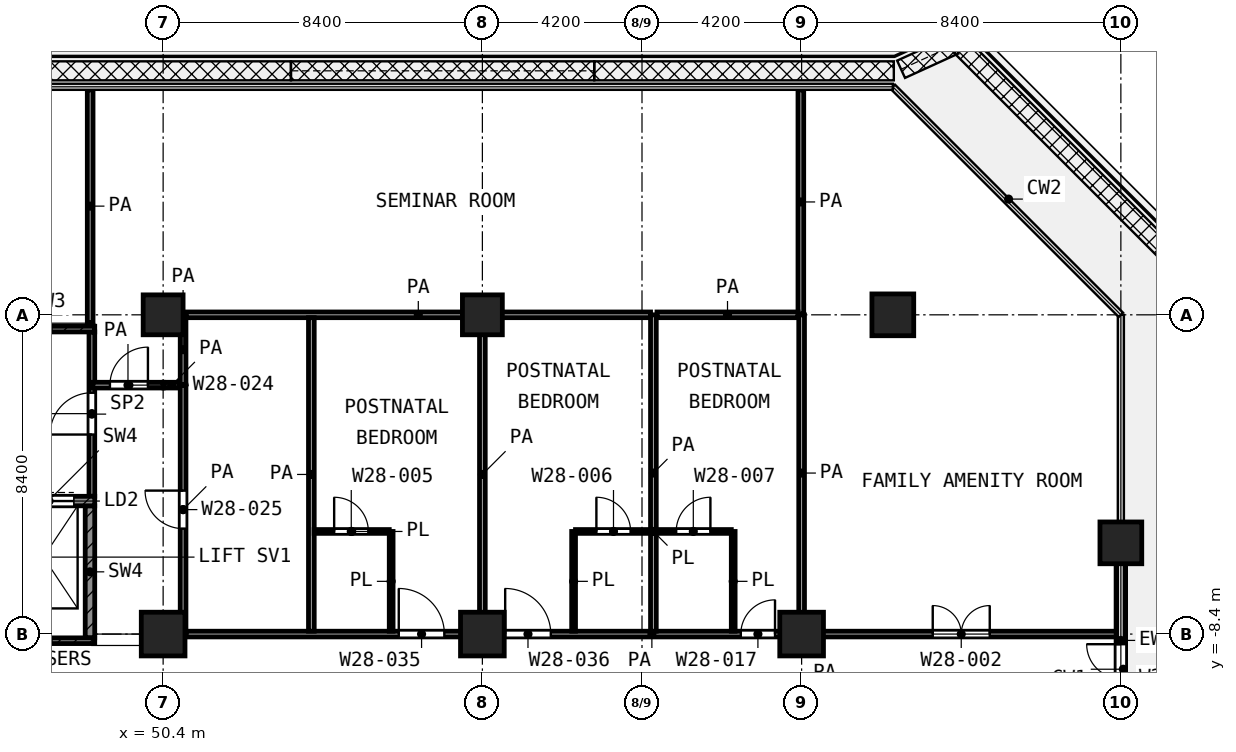
"""IFC4 building model, lengths in metres.
Left out: names, types, materials, properties, quantities, classifications, styles, units other than length and angle.
Written with IfcOpenShell. Run it as: python <this file> out.ifc"""

import sys

from ifc_helpers import new_model, si_unit, direction, frame, frame_2d, origin, origin_2d, place, context, subcontext, project, spatial, rectangle, extrude, element, fill, save


model = new_model("IFC4")
c1 = context("Model", 3, precision=1e-05, world=origin(), true_north=direction((0.0, 1.0)))
c2 = subcontext(c1, "Body", "Model", "MODEL_VIEW")
j1 = project(units=[si_unit("LENGTHUNIT", "METRE"), si_unit("PLANEANGLEUNIT", "RADIAN")], contexts=[c1])
p1 = place(None, origin())
s1 = spatial("IfcSite", under=j1, at=p1, CompositionType="ELEMENT")
p2 = place(p1, origin())
s2 = spatial("IfcBuilding", under=s1, at=p2, CompositionType="ELEMENT")
p3 = place(p2, frame((0.0, 0.0, 124.0)))
s3 = spatial("IfcBuildingStorey", under=s2, at=p3, CompositionType="ELEMENT", Elevation=124.0)
for number, where, z_axis, x_axis in (
    (1, (50.4, 0.0, 0.0), (0.0, 0.0, 1.0), (1.0, 0.0, 0.0)),
    (2, (58.8, 0.0, 0.0), (0.0, 0.0, 1.0), (1.0, 0.0, 0.0)),
):
    element("IfcColumn", number, at=place(p3, frame(where, z_axis=z_axis, x_axis=x_axis)), inside=s3, PredefinedType="COLUMN", context=c2, shape_type="SweptSolid", body=[
        extrude(rectangle(XDim=1.05, YDim=1.05, at=origin_2d()), origin(), (0.0, 0.0, 1.0), 4.2),
    ])
for number, where, z_axis, x_axis in (
    (3, (69.6, 0.0, 0.0), (0.0, 0.0, 1.0), (1.0, 0.0, 0.0)),
    (4, (75.6, -6.0, 0.0), (0.0, 0.0, 1.0), (1.0, 0.0, 0.0)),
):
    element("IfcColumn", number, at=place(p3, frame(where, z_axis=z_axis, x_axis=x_axis)), inside=s3, PredefinedType="COLUMN", context=c2, shape_type="SweptSolid", body=[
        extrude(rectangle(XDim=1.1, YDim=1.1, at=origin_2d()), origin(), (0.0, 0.0, 1.0), 4.2),
    ])
for number, where, z_axis, x_axis in (
    (5, (50.4, -8.4, 0.0), (0.0, 0.0, 1.0), (1.0, 0.0, 0.0)),
    (6, (58.8, -8.4, 0.0), (0.0, 0.0, 1.0), (1.0, 0.0, 0.0)),
    (7, (67.2, -8.4, 0.0), (0.0, 0.0, 1.0), (1.0, 0.0, 0.0)),
):
    element("IfcColumn", number, at=place(p3, frame(where, z_axis=z_axis, x_axis=x_axis)), inside=s3, PredefinedType="COLUMN", context=c2, shape_type="SweptSolid", body=[
        extrude(rectangle(XDim=1.15, YDim=1.15, at=origin_2d()), origin(), (0.0, 0.0, 1.0), 4.2),
    ])
p4 = place(p3, frame((75.6, -10.583, 0.0), z_axis=(0.0, 0.0, 1.0), x_axis=(0.0, 1.0, 0.0)))
e8 = element("IfcWall", 8, at=p4, inside=s3, PredefinedType="SOLIDWALL", context=c2, shape_type="SweptSolid", body=[
    extrude(rectangle(XDim=4.033, YDim=0.25, at=frame_2d((2.017, 0.0))), origin(), (0.0, 0.0, 1.0), 3.48),
])
p5 = place(p4, frame((0.117, 0.0, 0.0)))
e9 = element("IfcOpeningElement", 9, at=p5, cuts=e8, PredefinedType="OPENING", context=c2, shape_type="SweptSolid", body=[
    extrude(rectangle(XDim=1.8, YDim=2.1, at=frame_2d((0.9, 1.05))), frame((0.0, 0.135, 0.0), z_axis=(0.0, -1.0, 0.0), x_axis=(1.0, 0.0, 0.0)), (0.0, 0.0, 1.0), 0.27),
])
for number, where, z_axis, x_axis in (
    (10, (46.15, -0.375, 0.0), (0.0, 0.0, 1.0), (1.0, 0.0, 0.0)),
    (11, (46.15, -8.575, 0.0), (0.0, 0.0, 1.0), (1.0, 0.0, 0.0)),
):
    element("IfcWall", number, at=place(p3, frame(where, z_axis=z_axis, x_axis=x_axis)), inside=s3, PredefinedType="SHEAR", context=c2, shape_type="SweptSolid", body=[
        extrude(rectangle(XDim=2.45, YDim=0.15, at=frame_2d((1.225, 0.0))), origin(), (0.0, 0.0, 1.0), 3.6),
    ])
p6 = place(p3, frame((46.15, -4.9, 0.0), z_axis=(0.0, 0.0, 1.0), x_axis=(1.0, 0.0, 0.0)))
e12 = element("IfcWall", 12, at=p6, inside=s3, PredefinedType="SHEAR", context=c2, shape_type="SweptSolid", body=[
    extrude(rectangle(XDim=2.45, YDim=0.25, at=frame_2d((1.225, 0.0))), origin(), (0.0, 0.0, 1.0), 3.6),
])
p7 = place(p6, frame((0.6, 0.0, 0.0)))
e13 = element("IfcOpeningElement", 13, at=p7, cuts=e12, PredefinedType="OPENING", context=c2, shape_type="SweptSolid", body=[
    extrude(rectangle(XDim=1.3, YDim=2.1, at=frame_2d((0.65, 1.05))), frame((0.0, 0.135, 0.0), z_axis=(0.0, -1.0, 0.0), x_axis=(1.0, 0.0, 0.0)), (0.0, 0.0, 1.0), 0.27),
])
p8 = place(p3, frame((48.475, -8.5, 0.0), z_axis=(0.0, 0.0, 1.0), x_axis=(0.0, 1.0, 0.0)))
e14 = element("IfcWall", 14, at=p8, inside=s3, PredefinedType="SHEAR", context=c2, shape_type="SweptSolid", body=[
    extrude(rectangle(XDim=3.475, YDim=0.25, at=frame_2d((1.738, 0.0))), origin(), (0.0, 0.0, 1.0), 3.6),
])
p9 = place(p3, frame((48.525, -4.775, 0.0), z_axis=(0.0, 0.0, 1.0), x_axis=(0.0, 1.0, 0.0)))
e15 = element("IfcWall", 15, at=p9, inside=s3, PredefinedType="PARTITIONING", context=c2, shape_type="SweptSolid", body=[
    extrude(rectangle(XDim=4.325, YDim=0.15, at=frame_2d((2.163, 0.0))), origin(), (0.0, 0.0, 1.0), 3.6),
])
p10 = place(p9, frame((1.625, 0.0, 0.0)))
e16 = element("IfcOpeningElement", 16, at=p10, cuts=e15, PredefinedType="OPENING", context=c2, shape_type="SweptSolid", body=[
    extrude(rectangle(XDim=1.1, YDim=2.1, at=frame_2d((0.55, 1.05))), frame((0.0, 0.085, 0.0), z_axis=(0.0, -1.0, 0.0), x_axis=(1.0, 0.0, 0.0)), (0.0, 0.0, 1.0), 0.17),
])
p11 = place(p3, frame((54.375, -5.7, 0.0), z_axis=(0.0, 0.0, 1.0), x_axis=(1.0, 0.0, 0.0)))
e17 = element("IfcWall", 17, at=p11, inside=s3, PredefinedType="PARTITIONING", context=c2, shape_type="SweptSolid", body=[
    extrude(rectangle(XDim=1.975, YDim=0.1, at=frame_2d((0.988, 0.0))), origin(), (0.0, 0.0, 1.0), 3.6),
])
p12 = place(p11, frame((0.525, 0.0, 0.0)))
e18 = element("IfcOpeningElement", 18, at=p12, cuts=e17, PredefinedType="OPENING", context=c2, shape_type="SweptSolid", body=[
    extrude(rectangle(XDim=0.9, YDim=2.1, at=frame_2d((0.45, 1.05))), frame((0.0, 0.06, 0.0), z_axis=(0.0, -1.0, 0.0), x_axis=(1.0, 0.0, 0.0)), (0.0, 0.0, 1.0), 0.12),
])
p13 = place(p3, frame((61.25, -5.7, 0.0), z_axis=(0.0, 0.0, 1.0), x_axis=(1.0, 0.0, 0.0)))
e19 = element("IfcWall", 19, at=p13, inside=s3, PredefinedType="PARTITIONING", context=c2, shape_type="SweptSolid", body=[
    extrude(rectangle(XDim=4.1, YDim=0.1, at=frame_2d((2.05, 0.0))), origin(), (0.0, 0.0, 1.0), 3.6),
])
p14 = place(p13, frame((0.55, 0.0, 0.0)))
e20 = element("IfcOpeningElement", 20, at=p14, cuts=e19, PredefinedType="OPENING", context=c2, shape_type="SweptSolid", body=[
    extrude(rectangle(XDim=0.9, YDim=2.1, at=frame_2d((0.45, 1.05))), frame((0.0, 0.06, 0.0), z_axis=(0.0, -1.0, 0.0), x_axis=(1.0, 0.0, 0.0)), (0.0, 0.0, 1.0), 0.12),
])
p15 = place(p13, frame((2.65, 0.0, 0.0)))
e21 = element("IfcOpeningElement", 21, at=p15, cuts=e19, PredefinedType="OPENING", context=c2, shape_type="SweptSolid", body=[
    extrude(rectangle(XDim=0.9, YDim=2.1, at=frame_2d((0.45, 1.05))), frame((0.0, 0.06, 0.0), z_axis=(0.0, -1.0, 0.0), x_axis=(1.0, 0.0, 0.0)), (0.0, 0.0, 1.0), 0.12),
])
for number, where, z_axis, x_axis in (
    (22, (56.4, -8.325, 0.0), (0.0, 0.0, 1.0), (0.0, 1.0, 0.0)),
    (23, (61.2, -8.325, 0.0), (0.0, 0.0, 1.0), (0.0, 1.0, 0.0)),
    (24, (65.4, -8.325, 0.0), (0.0, 0.0, 1.0), (0.0, 1.0, 0.0)),
):
    element("IfcWall", number, at=place(p3, frame(where, z_axis=z_axis, x_axis=x_axis)), inside=s3, PredefinedType="PARTITIONING", context=c2, shape_type="SweptSolid", body=[
        extrude(rectangle(XDim=2.625, YDim=0.1, at=frame_2d((1.312, 0.0))), origin(), (0.0, 0.0, 1.0), 3.6),
    ])
p16 = place(p3, frame((51.0, -8.4, 0.0), z_axis=(0.0, 0.0, 1.0), x_axis=(1.0, 0.0, 0.0)))
e25 = element("IfcWall", 25, at=p16, inside=s3, PredefinedType="PARTITIONING", context=c2, shape_type="SweptSolid", body=[
    extrude(rectangle(XDim=24.52, YDim=0.15, at=frame_2d((12.26, 0.0))), origin(), (0.0, 0.0, 1.0), 3.6),
])
p17 = place(p16, frame((5.6, 0.0, 0.0)))
e26 = element("IfcOpeningElement", 26, at=p17, cuts=e25, PredefinedType="OPENING", context=c2, shape_type="SweptSolid", body=[
    extrude(rectangle(XDim=1.2, YDim=2.1, at=frame_2d((0.6, 1.05))), frame((0.0, 0.085, 0.0), z_axis=(0.0, -1.0, 0.0), x_axis=(1.0, 0.0, 0.0)), (0.0, 0.0, 1.0), 0.17),
])
p18 = place(p16, frame((8.4, 0.0, 0.0)))
e27 = element("IfcOpeningElement", 27, at=p18, cuts=e25, PredefinedType="OPENING", context=c2, shape_type="SweptSolid", body=[
    extrude(rectangle(XDim=1.2, YDim=2.1, at=frame_2d((0.6, 1.05))), frame((0.0, 0.085, 0.0), z_axis=(0.0, -1.0, 0.0), x_axis=(1.0, 0.0, 0.0)), (0.0, 0.0, 1.0), 0.17),
])
p19 = place(p16, frame((14.6, 0.0, 0.0)))
e28 = element("IfcOpeningElement", 28, at=p19, cuts=e25, PredefinedType="OPENING", context=c2, shape_type="SweptSolid", body=[
    extrude(rectangle(XDim=0.9, YDim=2.1, at=frame_2d((0.45, 1.05))), frame((0.0, 0.085, 0.0), z_axis=(0.0, -1.0, 0.0), x_axis=(1.0, 0.0, 0.0)), (0.0, 0.0, 1.0), 0.17),
])
p20 = place(p16, frame((19.65, 0.0, 0.0)))
e29 = element("IfcOpeningElement", 29, at=p20, cuts=e25, PredefinedType="OPENING", context=c2, shape_type="SweptSolid", body=[
    extrude(rectangle(XDim=1.5, YDim=2.1, at=frame_2d((0.75, 1.05))), frame((0.0, 0.085, 0.0), z_axis=(0.0, -1.0, 0.0), x_axis=(1.0, 0.0, 0.0)), (0.0, 0.0, 1.0), 0.17),
])
p21 = place(p3, frame((48.55, -1.85, 0.0), z_axis=(0.0, 0.0, 1.0), x_axis=(1.0, 0.0, 0.0)))
e30 = element("IfcWall", 30, at=p21, inside=s3, PredefinedType="PARTITIONING", context=c2, shape_type="SweptSolid", body=[
    extrude(rectangle(XDim=1.85, YDim=0.15, at=frame_2d((0.925, 0.0))), origin(), (0.0, 0.0, 1.0), 3.6),
])
p22 = place(p21, frame((0.45, 0.0, 0.0)))
e31 = element("IfcOpeningElement", 31, at=p22, cuts=e30, PredefinedType="OPENING", context=c2, shape_type="SweptSolid", body=[
    extrude(rectangle(XDim=1.0, YDim=2.1, at=frame_2d((0.5, 1.05))), frame((0.0, 0.085, 0.0), z_axis=(0.0, -1.0, 0.0), x_axis=(1.0, 0.0, 0.0)), (0.0, 0.0, 1.0), 0.17),
])
p23 = place(p3, frame((50.42, -1.85, 0.0), z_axis=(0.0, 0.0, 1.0), x_axis=(1.0, 0.0, 0.0)))
e32 = element("IfcWall", 32, at=p23, inside=s3, PredefinedType="PARTITIONING", context=c2, shape_type="SweptSolid", body=[
    extrude(rectangle(XDim=0.41, YDim=0.15, at=frame_2d((0.205, 0.0))), origin(), (0.0, 0.0, 1.0), 3.6),
])
p24 = place(p3, frame((51.003, 0.0, 0.0), z_axis=(0.0, 0.0, 1.0), x_axis=(1.0, 0.0, 0.0)))
e33 = element("IfcWall", 33, at=p24, inside=s3, PredefinedType="PARTITIONING", context=c2, shape_type="SweptSolid", body=[
    extrude(rectangle(XDim=12.222, YDim=0.15, at=frame_2d((6.111, 0.0))), origin(), (0.0, 0.0, 1.0), 3.6),
])
p25 = place(p3, frame((63.395, 0.0, 0.0), z_axis=(0.0, 0.0, 1.0), x_axis=(1.0, 0.0, 0.0)))
e34 = element("IfcWall", 34, at=p25, inside=s3, PredefinedType="PARTITIONING", context=c2, shape_type="SweptSolid", body=[
    extrude(rectangle(XDim=3.71, YDim=0.15, at=frame_2d((1.855, 0.0))), origin(), (0.0, 0.0, 1.0), 3.6),
])
p26 = place(p3, frame((48.48, -0.2, 0.0), z_axis=(0.0, 0.0, 1.0), x_axis=(0.0, 1.0, 0.0)))
e35 = element("IfcWall", 35, at=p26, inside=s3, PredefinedType="PARTITIONING", context=c2, shape_type="SweptSolid", body=[
    extrude(rectangle(XDim=6.12, YDim=0.15, at=frame_2d((3.06, 0.0))), origin(), (0.0, 0.0, 1.0), 3.6),
])
p27 = place(p3, frame((50.925, -8.4, 0.0), z_axis=(0.0, 0.0, 1.0), x_axis=(0.0, 1.0, 0.0)))
e36 = element("IfcWall", 36, at=p27, inside=s3, PredefinedType="PARTITIONING", context=c2, shape_type="SweptSolid", body=[
    extrude(rectangle(XDim=6.55, YDim=0.15, at=frame_2d((3.275, 0.0))), origin(), (0.0, 0.0, 1.0), 3.6),
])
p28 = place(p27, frame((2.775, 0.0, 0.0)))
e37 = element("IfcOpeningElement", 37, at=p28, cuts=e36, PredefinedType="OPENING", context=c2, shape_type="SweptSolid", body=[
    extrude(rectangle(XDim=1.0, YDim=2.1, at=frame_2d((0.5, 1.05))), frame((0.0, 0.085, 0.0), z_axis=(0.0, -1.0, 0.0), x_axis=(1.0, 0.0, 0.0)), (0.0, 0.0, 1.0), 0.17),
])
p29 = place(p3, frame((50.925, -1.83, 0.0), z_axis=(0.0, 0.0, 1.0), x_axis=(0.0, 1.0, 0.0)))
e38 = element("IfcWall", 38, at=p29, inside=s3, PredefinedType="PARTITIONING", context=c2, shape_type="SweptSolid", body=[
    extrude(rectangle(XDim=1.827, YDim=0.15, at=frame_2d((0.914, 0.0))), origin(), (0.0, 0.0, 1.0), 3.6),
])
for number, where, z_axis, x_axis in (
    (39, (54.3, -8.325, 0.0), (0.0, 0.0, 1.0), (0.0, 1.0, 0.0)),
    (40, (58.8, -8.325, 0.0), (0.0, 0.0, 1.0), (0.0, 1.0, 0.0)),
):
    element("IfcWall", number, at=place(p3, frame(where, z_axis=z_axis, x_axis=x_axis)), inside=s3, PredefinedType="PARTITIONING", context=c2, shape_type="SweptSolid", body=[
        extrude(rectangle(XDim=8.25, YDim=0.15, at=frame_2d((4.125, 0.0))), origin(), (0.0, 0.0, 1.0), 3.6),
    ])
p30 = place(p3, frame((63.3, -8.325, 0.0), z_axis=(0.0, 0.0, 1.0), x_axis=(0.0, 1.0, 0.0)))
e41 = element("IfcWall", 41, at=p30, inside=s3, PredefinedType="PARTITIONING", context=c2, shape_type="SweptSolid", body=[
    extrude(rectangle(XDim=8.325, YDim=0.15, at=frame_2d((4.163, 0.0))), origin(), (0.0, 0.0, 1.0), 3.6),
])
p31 = place(p3, frame((67.18, 0.02, 0.0), z_axis=(0.0, 0.0, 1.0), x_axis=(0.0, 1.0, 0.0)))
e42 = element("IfcWall", 42, at=p31, inside=s3, PredefinedType="PARTITIONING", context=c2, shape_type="SweptSolid", body=[
    extrude(rectangle(XDim=5.9, YDim=0.15, at=frame_2d((2.95, 0.0))), origin(), (0.0, 0.0, 1.0), 3.6),
])
p32 = place(p3, frame((67.2, -8.325, 0.0), z_axis=(0.0, 0.0, 1.0), x_axis=(0.0, 1.0, 0.0)))
e43 = element("IfcWall", 43, at=p32, inside=s3, PredefinedType="PARTITIONING", context=c2, shape_type="SweptSolid", body=[
    extrude(rectangle(XDim=8.323, YDim=0.15, at=frame_2d((4.162, 0.0))), origin(), (0.0, 0.0, 1.0), 3.6),
])
p33 = place(p5, origin())
e44 = element("IfcDoor", 44, at=p33, inside=s3, OperationType="DOUBLE_DOOR_SINGLE_SWING", PredefinedType="DOOR", context=c2, shape_type="SweptSolid", body=[
    extrude(rectangle(XDim=1.8, YDim=2.1, at=frame_2d((0.9, 1.05))), frame((0.0, 0.025, 0.0), z_axis=(0.0, -1.0, 0.0), x_axis=(1.0, 0.0, 0.0)), (0.0, 0.0, 1.0), 0.05),
])
fill(e9, e44)
p34 = place(p7, origin())
e45 = element("IfcDoor", 45, at=p34, inside=s3, OperationType="DOUBLE_DOOR_SLIDING", PredefinedType="DOOR", context=c2, shape_type="SweptSolid", body=[
    extrude(rectangle(XDim=1.3, YDim=2.1, at=frame_2d((0.65, 1.05))), frame((0.0, 0.025, 0.0), z_axis=(0.0, -1.0, 0.0), x_axis=(1.0, 0.0, 0.0)), (0.0, 0.0, 1.0), 0.05),
])
fill(e13, e45)
p35 = place(p10, origin())
e46 = element("IfcDoor", 46, at=p35, inside=s3, OperationType="SINGLE_SWING_LEFT", PredefinedType="DOOR", context=c2, shape_type="SweptSolid", body=[
    extrude(rectangle(XDim=1.1, YDim=2.1, at=frame_2d((0.55, 1.05))), frame((0.0, 0.025, 0.0), z_axis=(0.0, -1.0, 0.0), x_axis=(1.0, 0.0, 0.0)), (0.0, 0.0, 1.0), 0.05),
])
fill(e16, e46)
p36 = place(p22, origin())
e47 = element("IfcDoor", 47, at=p36, inside=s3, OperationType="SINGLE_SWING_RIGHT", PredefinedType="DOOR", context=c2, shape_type="SweptSolid", body=[
    extrude(rectangle(XDim=1.0, YDim=2.1, at=frame_2d((0.5, 1.05))), frame((0.0, 0.025, 0.0), z_axis=(0.0, -1.0, 0.0), x_axis=(1.0, 0.0, 0.0)), (0.0, 0.0, 1.0), 0.05),
])
fill(e31, e47)
p37 = place(p28, origin())
e48 = element("IfcDoor", 48, at=p37, inside=s3, OperationType="SINGLE_SWING_RIGHT", PredefinedType="DOOR", context=c2, shape_type="SweptSolid", body=[
    extrude(rectangle(XDim=1.0, YDim=2.1, at=frame_2d((0.5, 1.05))), frame((0.0, 0.025, 0.0), z_axis=(0.0, -1.0, 0.0), x_axis=(1.0, 0.0, 0.0)), (0.0, 0.0, 1.0), 0.05),
])
fill(e37, e48)
p38 = place(p17, origin())
e49 = element("IfcDoor", 49, at=p38, inside=s3, OperationType="SINGLE_SWING_LEFT", PredefinedType="DOOR", context=c2, shape_type="SweptSolid", body=[
    extrude(rectangle(XDim=1.2, YDim=2.1, at=frame_2d((0.6, 1.05))), frame((0.0, 0.025, 0.0), z_axis=(0.0, -1.0, 0.0), x_axis=(1.0, 0.0, 0.0)), (0.0, 0.0, 1.0), 0.05),
])
fill(e26, e49)
p39 = place(p12, origin())
e50 = element("IfcDoor", 50, at=p39, inside=s3, OperationType="SINGLE_SWING_LEFT", PredefinedType="DOOR", context=c2, shape_type="SweptSolid", body=[
    extrude(rectangle(XDim=0.9, YDim=2.1, at=frame_2d((0.45, 1.05))), frame((0.0, 0.025, 0.0), z_axis=(0.0, -1.0, 0.0), x_axis=(1.0, 0.0, 0.0)), (0.0, 0.0, 1.0), 0.05),
])
fill(e18, e50)
p40 = place(p18, origin())
e51 = element("IfcDoor", 51, at=p40, inside=s3, OperationType="SINGLE_SWING_LEFT", PredefinedType="DOOR", context=c2, shape_type="SweptSolid", body=[
    extrude(rectangle(XDim=1.2, YDim=2.1, at=frame_2d((0.6, 1.05))), frame((0.0, 0.025, 0.0), z_axis=(0.0, -1.0, 0.0), x_axis=(1.0, 0.0, 0.0)), (0.0, 0.0, 1.0), 0.05),
])
fill(e27, e51)
p41 = place(p14, origin())
e52 = element("IfcDoor", 52, at=p41, inside=s3, OperationType="SINGLE_SWING_LEFT", PredefinedType="DOOR", context=c2, shape_type="SweptSolid", body=[
    extrude(rectangle(XDim=0.9, YDim=2.1, at=frame_2d((0.45, 1.05))), frame((0.0, 0.025, 0.0), z_axis=(0.0, -1.0, 0.0), x_axis=(1.0, 0.0, 0.0)), (0.0, 0.0, 1.0), 0.05),
])
fill(e20, e52)
p42 = place(p19, origin())
e53 = element("IfcDoor", 53, at=p42, inside=s3, OperationType="SINGLE_SWING_RIGHT", PredefinedType="DOOR", context=c2, shape_type="SweptSolid", body=[
    extrude(rectangle(XDim=0.9, YDim=2.1, at=frame_2d((0.45, 1.05))), frame((0.0, 0.025, 0.0), z_axis=(0.0, -1.0, 0.0), x_axis=(1.0, 0.0, 0.0)), (0.0, 0.0, 1.0), 0.05),
])
fill(e28, e53)
p43 = place(p15, origin())
e54 = element("IfcDoor", 54, at=p43, inside=s3, OperationType="SINGLE_SWING_RIGHT", PredefinedType="DOOR", context=c2, shape_type="SweptSolid", body=[
    extrude(rectangle(XDim=0.9, YDim=2.1, at=frame_2d((0.45, 1.05))), frame((0.0, 0.025, 0.0), z_axis=(0.0, -1.0, 0.0), x_axis=(1.0, 0.0, 0.0)), (0.0, 0.0, 1.0), 0.05),
])
fill(e21, e54)
p44 = place(p20, origin())
e55 = element("IfcDoor", 55, at=p44, inside=s3, OperationType="DOUBLE_DOOR_SINGLE_SWING", PredefinedType="DOOR", context=c2, shape_type="SweptSolid", body=[
    extrude(rectangle(XDim=1.5, YDim=2.1, at=frame_2d((0.75, 1.05))), frame((0.0, 0.025, 0.0), z_axis=(0.0, -1.0, 0.0), x_axis=(1.0, 0.0, 0.0)), (0.0, 0.0, 1.0), 0.05),
])
fill(e29, e55)
save(model, sys.argv[1])
